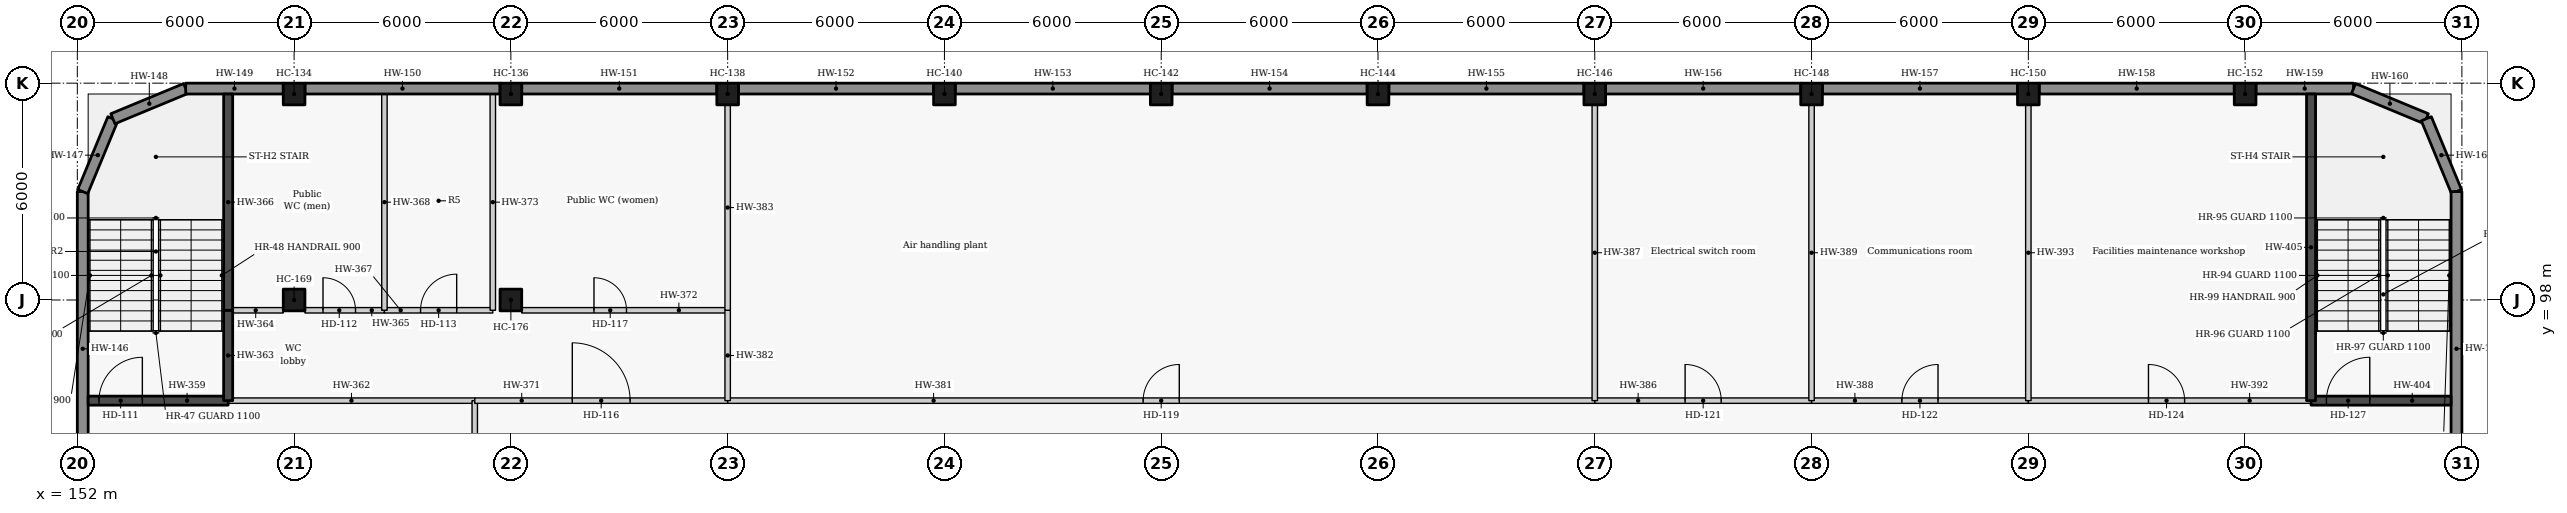
"""IFC4 building model, lengths in metres.
Left out: names, types, materials, properties, quantities, classifications, styles, units other than length and angle.
Written with IfcOpenShell. Run it as: python <this file> out.ifc"""

import sys

from ifc_helpers import new_model, si_unit, direction, frame, frame_2d, origin, origin_2d, place, context, subcontext, project, spatial, rectangle, extrude, element, fill, save


model = new_model("IFC4")
c1 = context("Model", 3, precision=1e-05, world=origin(), true_north=direction((0.0, 1.0)))
c2 = subcontext(c1, "Body", "Model", "MODEL_VIEW")
j1 = project(units=[si_unit("LENGTHUNIT", "METRE"), si_unit("PLANEANGLEUNIT", "RADIAN")], contexts=[c1])
p1 = place(None, origin())
s1 = spatial("IfcSite", under=j1, at=p1, CompositionType="ELEMENT")
p2 = place(p1, origin())
s2 = spatial("IfcBuilding", under=s1, at=p2, CompositionType="ELEMENT")
p3 = place(p2, frame((0.0, 0.0, 15.6)))
s3 = spatial("IfcBuildingStorey", under=s2, at=p3, CompositionType="ELEMENT", Elevation=15.6)
for number, where, z_axis, x_axis in (
    (1, (158.0, 103.7, 0.0), (0.0, 0.0, 1.0), (1.0, 0.0, 0.0)),
    (2, (164.0, 103.7, 0.0), (0.0, 0.0, 1.0), (1.0, 0.0, 0.0)),
    (3, (170.0, 103.7, 0.0), (0.0, 0.0, 1.0), (1.0, 0.0, 0.0)),
    (4, (176.0, 103.7, 0.0), (0.0, 0.0, 1.0), (1.0, 0.0, 0.0)),
    (5, (182.0, 103.7, 0.0), (0.0, 0.0, 1.0), (1.0, 0.0, 0.0)),
    (6, (188.0, 103.7, 0.0), (0.0, 0.0, 1.0), (1.0, 0.0, 0.0)),
    (7, (194.0, 103.7, 0.0), (0.0, 0.0, 1.0), (1.0, 0.0, 0.0)),
    (8, (200.0, 103.7, 0.0), (0.0, 0.0, 1.0), (1.0, 0.0, 0.0)),
    (9, (206.0, 103.7, 0.0), (0.0, 0.0, 1.0), (1.0, 0.0, 0.0)),
    (10, (212.0, 103.7, 0.0), (0.0, 0.0, 1.0), (1.0, 0.0, 0.0)),
    (11, (158.0, 98.0, 0.0), (0.0, 0.0, 1.0), (1.0, 0.0, 0.0)),
    (12, (164.0, 98.0, 0.0), (0.0, 0.0, 1.0), (1.0, 0.0, 0.0)),
):
    element("IfcColumn", number, at=place(p3, frame(where, z_axis=z_axis, x_axis=x_axis)), inside=s3, PredefinedType="COLUMN", context=c2, shape_type="SweptSolid", body=[
        extrude(rectangle(XDim=0.6, YDim=0.6, at=origin_2d()), origin(), (0.0, 0.0, 1.0), 4.2),
    ])
p4 = place(p3, frame((152.15, 92.3, 0.0), z_axis=(0.0, 0.0, 1.0), x_axis=(0.0, 1.0, 0.0)))
e13 = element("IfcWall", 13, at=p4, inside=s3, PredefinedType="SOLIDWALL", context=c2, shape_type="SweptSolid", body=[
    extrude(rectangle(XDim=8.7, YDim=0.3, at=frame_2d((4.35, 0.0))), origin(), (0.0, 0.0, 1.0), 4.2),
])
for number, where, z_axis, x_axis in (
    (14, (152.15, 101.0, 0.0), (0.0, 0.0, 1.0), (0.383, 0.924, 0.0)),
    (15, (152.985, 103.015, 0.0), (0.0, 0.0, 1.0), (0.924, 0.383, 0.0)),
):
    element("IfcWall", number, at=place(p3, frame(where, z_axis=z_axis, x_axis=x_axis)), inside=s3, PredefinedType="SOLIDWALL", context=c2, shape_type="SweptSolid", body=[
        extrude(rectangle(XDim=2.181, YDim=0.3, at=frame_2d((1.091, 0.0))), origin(), (0.0, 0.0, 1.0), 4.2),
    ])
p5 = place(p3, frame((155.0, 103.85, 0.0), z_axis=(0.0, 0.0, 1.0), x_axis=(1.0, 0.0, 0.0)))
e16 = element("IfcWall", 16, at=p5, inside=s3, PredefinedType="SOLIDWALL", context=c2, shape_type="SweptSolid", body=[
    extrude(rectangle(XDim=2.7, YDim=0.3, at=frame_2d((1.35, 0.0))), origin(), (0.0, 0.0, 1.0), 4.2),
])
for number, where, z_axis, x_axis in (
    (17, (158.3, 103.85, 0.0), (0.0, 0.0, 1.0), (1.0, 0.0, 0.0)),
    (18, (164.3, 103.85, 0.0), (0.0, 0.0, 1.0), (1.0, 0.0, 0.0)),
    (19, (170.3, 103.85, 0.0), (0.0, 0.0, 1.0), (1.0, 0.0, 0.0)),
    (20, (176.3, 103.85, 0.0), (0.0, 0.0, 1.0), (1.0, 0.0, 0.0)),
    (21, (182.3, 103.85, 0.0), (0.0, 0.0, 1.0), (1.0, 0.0, 0.0)),
    (22, (188.3, 103.85, 0.0), (0.0, 0.0, 1.0), (1.0, 0.0, 0.0)),
    (23, (194.3, 103.85, 0.0), (0.0, 0.0, 1.0), (1.0, 0.0, 0.0)),
    (24, (200.3, 103.85, 0.0), (0.0, 0.0, 1.0), (1.0, 0.0, 0.0)),
    (25, (206.3, 103.85, 0.0), (0.0, 0.0, 1.0), (1.0, 0.0, 0.0)),
):
    element("IfcWall", number, at=place(p3, frame(where, z_axis=z_axis, x_axis=x_axis)), inside=s3, PredefinedType="SOLIDWALL", context=c2, shape_type="SweptSolid", body=[
        extrude(rectangle(XDim=5.4, YDim=0.3, at=frame_2d((2.7, 0.0))), origin(), (0.0, 0.0, 1.0), 4.2),
    ])
p6 = place(p3, frame((212.3, 103.85, 0.0), z_axis=(0.0, 0.0, 1.0), x_axis=(1.0, 0.0, 0.0)))
e26 = element("IfcWall", 26, at=p6, inside=s3, PredefinedType="SOLIDWALL", context=c2, shape_type="SweptSolid", body=[
    extrude(rectangle(XDim=2.7, YDim=0.3, at=frame_2d((1.35, 0.0))), origin(), (0.0, 0.0, 1.0), 4.2),
])
for number, where, z_axis, x_axis in (
    (27, (215.0, 103.85, 0.0), (0.0, 0.0, 1.0), (0.924, -0.383, 0.0)),
    (28, (217.015, 103.015, 0.0), (0.0, 0.0, 1.0), (0.383, -0.924, 0.0)),
):
    element("IfcWall", number, at=place(p3, frame(where, z_axis=z_axis, x_axis=x_axis)), inside=s3, PredefinedType="SOLIDWALL", context=c2, shape_type="SweptSolid", body=[
        extrude(rectangle(XDim=2.181, YDim=0.3, at=frame_2d((1.091, 0.0))), origin(), (0.0, 0.0, 1.0), 4.2),
    ])
p7 = place(p3, frame((217.85, 101.0, 0.0), z_axis=(0.0, 0.0, 1.0), x_axis=(0.0, -1.0, 0.0)))
e29 = element("IfcWall", 29, at=p7, inside=s3, PredefinedType="SOLIDWALL", context=c2, shape_type="SweptSolid", body=[
    extrude(rectangle(XDim=8.7, YDim=0.3, at=frame_2d((4.35, 0.0))), origin(), (0.0, 0.0, 1.0), 4.2),
])
p8 = place(p3, frame((152.3, 95.215, 0.0), z_axis=(0.0, 0.0, 1.0), x_axis=(1.0, 0.0, 0.0)))
e30 = element("IfcWall", 30, at=p8, inside=s3, PredefinedType="SOLIDWALL", context=c2, shape_type="SweptSolid", body=[
    extrude(rectangle(XDim=3.875, YDim=0.25, at=frame_2d((1.938, 0.0))), origin(), (0.0, 0.0, 1.0), 4.2),
])
p9 = place(p8, frame((0.3, 0.0, 0.0)))
e31 = element("IfcOpeningElement", 31, at=p9, cuts=e30, PredefinedType="OPENING", context=c2, shape_type="SweptSolid", body=[
    extrude(rectangle(XDim=1.2, YDim=2.1, at=frame_2d((0.6, 1.05))), frame((0.0, 0.135, 0.0), z_axis=(0.0, -1.0, 0.0), x_axis=(1.0, 0.0, 0.0)), (0.0, 0.0, 1.0), 0.27),
])
p10 = place(p3, frame((163.0, 95.215, 0.0), z_axis=(0.0, 0.0, 1.0), x_axis=(-1.0, 0.0, 0.0)))
e32 = element("IfcWall", 32, at=p10, inside=s3, PredefinedType="PARTITIONING", context=c2, shape_type="SweptSolid", body=[
    extrude(rectangle(XDim=6.825, YDim=0.15, at=frame_2d((3.413, 0.0))), origin(), (0.0, 0.0, 1.0), 3.85),
])
p11 = place(p3, frame((156.175, 97.715, 0.0), z_axis=(0.0, 0.0, 1.0), x_axis=(0.0, -1.0, 0.0)))
e33 = element("IfcWall", 33, at=p11, inside=s3, PredefinedType="SOLIDWALL", context=c2, shape_type="SweptSolid", body=[
    extrude(rectangle(XDim=2.5, YDim=0.25, at=frame_2d((1.25, 0.0))), origin(), (0.0, 0.0, 1.0), 4.2),
])
p12 = place(p3, frame((156.175, 97.715, 0.0), z_axis=(0.0, 0.0, 1.0), x_axis=(1.0, 0.0, 0.0)))
e34 = element("IfcWall", 34, at=p12, inside=s3, PredefinedType="PLUMBINGWALL", context=c2, shape_type="SweptSolid", body=[
    extrude(rectangle(XDim=1.525, YDim=0.15, at=frame_2d((0.762, 0.0))), origin(), (0.0, 0.0, 1.0), 3.85),
])
p13 = place(p3, frame((158.3, 97.715, 0.0), z_axis=(0.0, 0.0, 1.0), x_axis=(1.0, 0.0, 0.0)))
e35 = element("IfcWall", 35, at=p13, inside=s3, PredefinedType="PLUMBINGWALL", context=c2, shape_type="SweptSolid", body=[
    extrude(rectangle(XDim=2.2, YDim=0.15, at=frame_2d((1.1, 0.0))), origin(), (0.0, 0.0, 1.0), 3.85),
])
p14 = place(p13, frame((0.5, 0.0, 0.0)))
e36 = element("IfcOpeningElement", 36, at=p14, cuts=e35, PredefinedType="OPENING", context=c2, shape_type="SweptSolid", body=[
    extrude(rectangle(XDim=0.9, YDim=2.1, at=frame_2d((0.45, 1.05))), frame((0.0, 0.085, 0.0), z_axis=(0.0, -1.0, 0.0), x_axis=(1.0, 0.0, 0.0)), (0.0, 0.0, 1.0), 0.17),
])
p15 = place(p3, frame((156.175, 103.7, 0.0), z_axis=(0.0, 0.0, 1.0), x_axis=(0.0, -1.0, 0.0)))
e37 = element("IfcWall", 37, at=p15, inside=s3, PredefinedType="SOLIDWALL", context=c2, shape_type="SweptSolid", body=[
    extrude(rectangle(XDim=5.985, YDim=0.25, at=frame_2d((2.992, 0.0))), origin(), (0.0, 0.0, 1.0), 4.2),
])
p16 = place(p3, frame((160.5, 97.715, 0.0), z_axis=(0.0, 0.0, 1.0), x_axis=(1.0, 0.0, 0.0)))
e38 = element("IfcWall", 38, at=p16, inside=s3, PredefinedType="PLUMBINGWALL", context=c2, shape_type="SweptSolid", body=[
    extrude(rectangle(XDim=3.0, YDim=0.15, at=frame_2d((1.5, 0.0))), origin(), (0.0, 0.0, 1.0), 3.85),
])
p17 = place(p16, frame((1.0, 0.0, 0.0)))
e39 = element("IfcOpeningElement", 39, at=p17, cuts=e38, PredefinedType="OPENING", context=c2, shape_type="SweptSolid", body=[
    extrude(rectangle(XDim=1.0, YDim=2.1, at=frame_2d((0.5, 1.05))), frame((0.0, 0.085, 0.0), z_axis=(0.0, -1.0, 0.0), x_axis=(1.0, 0.0, 0.0)), (0.0, 0.0, 1.0), 0.17),
])
p18 = place(p3, frame((160.5, 103.7, 0.0), z_axis=(0.0, 0.0, 1.0), x_axis=(0.0, -1.0, 0.0)))
e40 = element("IfcWall", 40, at=p18, inside=s3, PredefinedType="PLUMBINGWALL", context=c2, shape_type="SweptSolid", body=[
    extrude(rectangle(XDim=5.985, YDim=0.15, at=frame_2d((2.992, 0.0))), origin(), (0.0, 0.0, 1.0), 3.85),
])
p19 = place(p3, frame((163.0, 64.785, 0.0), z_axis=(0.0, 0.0, 1.0), x_axis=(0.0, 1.0, 0.0)))
e41 = element("IfcWall", 41, at=p19, inside=s3, PredefinedType="PARTITIONING", context=c2, shape_type="SweptSolid", body=[
    extrude(rectangle(XDim=30.43, YDim=0.15, at=frame_2d((15.215, 0.0))), origin(), (0.0, 0.0, 1.0), 3.85),
])
p20 = place(p19, frame((15.68, 0.0, 0.0)))
e42 = element("IfcOpeningElement", 42, at=p20, cuts=e41, PredefinedType="OPENING", context=c2, shape_type="SweptSolid", body=[
    extrude(rectangle(XDim=1.0, YDim=2.1, at=frame_2d((0.5, 1.05))), frame((0.0, 0.085, 0.0), z_axis=(0.0, -1.0, 0.0), x_axis=(1.0, 0.0, 0.0)), (0.0, 0.0, 1.0), 0.17),
])
p21 = place(p3, frame((163.0, 95.215, 0.0), z_axis=(0.0, 0.0, 1.0), x_axis=(1.0, 0.0, 0.0)))
e43 = element("IfcWall", 43, at=p21, inside=s3, PredefinedType="PARTITIONING", context=c2, shape_type="SweptSolid", body=[
    extrude(rectangle(XDim=7.0, YDim=0.15, at=frame_2d((3.5, 0.0))), origin(), (0.0, 0.0, 1.0), 3.85),
])
p22 = place(p21, frame((2.7, 0.0, 0.0)))
e44 = element("IfcOpeningElement", 44, at=p22, cuts=e43, PredefinedType="OPENING", context=c2, shape_type="SweptSolid", body=[
    extrude(rectangle(XDim=1.6, YDim=2.1, at=frame_2d((0.8, 1.05))), frame((0.0, 0.085, 0.0), z_axis=(0.0, -1.0, 0.0), x_axis=(1.0, 0.0, 0.0)), (0.0, 0.0, 1.0), 0.17),
])
p23 = place(p3, frame((164.3, 97.715, 0.0), z_axis=(0.0, 0.0, 1.0), x_axis=(1.0, 0.0, 0.0)))
e45 = element("IfcWall", 45, at=p23, inside=s3, PredefinedType="PLUMBINGWALL", context=c2, shape_type="SweptSolid", body=[
    extrude(rectangle(XDim=5.7, YDim=0.15, at=frame_2d((2.85, 0.0))), origin(), (0.0, 0.0, 1.0), 3.85),
])
p24 = place(p23, frame((2.0, 0.0, 0.0)))
e46 = element("IfcOpeningElement", 46, at=p24, cuts=e45, PredefinedType="OPENING", context=c2, shape_type="SweptSolid", body=[
    extrude(rectangle(XDim=0.9, YDim=2.1, at=frame_2d((0.45, 1.05))), frame((0.0, 0.085, 0.0), z_axis=(0.0, -1.0, 0.0), x_axis=(1.0, 0.0, 0.0)), (0.0, 0.0, 1.0), 0.17),
])
p25 = place(p3, frame((163.5, 103.7, 0.0), z_axis=(0.0, 0.0, 1.0), x_axis=(0.0, -1.0, 0.0)))
e47 = element("IfcWall", 47, at=p25, inside=s3, PredefinedType="PLUMBINGWALL", context=c2, shape_type="SweptSolid", body=[
    extrude(rectangle(XDim=5.985, YDim=0.15, at=frame_2d((2.992, 0.0))), origin(), (0.0, 0.0, 1.0), 3.85),
])
p26 = place(p3, frame((170.0, 95.215, 0.0), z_axis=(0.0, 0.0, 1.0), x_axis=(1.0, 0.0, 0.0)))
e48 = element("IfcWall", 48, at=p26, inside=s3, PredefinedType="PARTITIONING", context=c2, shape_type="SweptSolid", body=[
    extrude(rectangle(XDim=24.0, YDim=0.15, at=frame_2d((12.0, 0.0))), origin(), (0.0, 0.0, 1.0), 3.85),
])
p27 = place(p26, frame((11.5, 0.0, 0.0)))
e49 = element("IfcOpeningElement", 49, at=p27, cuts=e48, PredefinedType="OPENING", context=c2, shape_type="SweptSolid", body=[
    extrude(rectangle(XDim=1.0, YDim=2.1, at=frame_2d((0.5, 1.05))), frame((0.0, 0.085, 0.0), z_axis=(0.0, -1.0, 0.0), x_axis=(1.0, 0.0, 0.0)), (0.0, 0.0, 1.0), 0.17),
])
p28 = place(p3, frame((170.0, 97.715, 0.0), z_axis=(0.0, 0.0, 1.0), x_axis=(0.0, -1.0, 0.0)))
e50 = element("IfcWall", 50, at=p28, inside=s3, PredefinedType="PARTITIONING", context=c2, shape_type="SweptSolid", body=[
    extrude(rectangle(XDim=2.5, YDim=0.15, at=frame_2d((1.25, 0.0))), origin(), (0.0, 0.0, 1.0), 3.85),
])
p29 = place(p3, frame((170.0, 103.4, 0.0), z_axis=(0.0, 0.0, 1.0), x_axis=(0.0, -1.0, 0.0)))
e51 = element("IfcWall", 51, at=p29, inside=s3, PredefinedType="PLUMBINGWALL", context=c2, shape_type="SweptSolid", body=[
    extrude(rectangle(XDim=5.685, YDim=0.15, at=frame_2d((2.842, 0.0))), origin(), (0.0, 0.0, 1.0), 3.85),
])
p30 = place(p3, frame((194.0, 95.215, 0.0), z_axis=(0.0, 0.0, 1.0), x_axis=(1.0, 0.0, 0.0)))
e52 = element("IfcWall", 52, at=p30, inside=s3, PredefinedType="PARTITIONING", context=c2, shape_type="SweptSolid", body=[
    extrude(rectangle(XDim=6.0, YDim=0.15, at=frame_2d((3.0, 0.0))), origin(), (0.0, 0.0, 1.0), 3.85),
])
p31 = place(p30, frame((2.5, 0.0, 0.0)))
e53 = element("IfcOpeningElement", 53, at=p31, cuts=e52, PredefinedType="OPENING", context=c2, shape_type="SweptSolid", body=[
    extrude(rectangle(XDim=1.0, YDim=2.1, at=frame_2d((0.5, 1.05))), frame((0.0, 0.085, 0.0), z_axis=(0.0, -1.0, 0.0), x_axis=(1.0, 0.0, 0.0)), (0.0, 0.0, 1.0), 0.17),
])
p32 = place(p3, frame((194.0, 103.4, 0.0), z_axis=(0.0, 0.0, 1.0), x_axis=(0.0, -1.0, 0.0)))
e54 = element("IfcWall", 54, at=p32, inside=s3, PredefinedType="PARTITIONING", context=c2, shape_type="SweptSolid", body=[
    extrude(rectangle(XDim=8.185, YDim=0.15, at=frame_2d((4.092, 0.0))), origin(), (0.0, 0.0, 1.0), 3.85),
])
p33 = place(p3, frame((200.0, 95.215, 0.0), z_axis=(0.0, 0.0, 1.0), x_axis=(1.0, 0.0, 0.0)))
e55 = element("IfcWall", 55, at=p33, inside=s3, PredefinedType="PARTITIONING", context=c2, shape_type="SweptSolid", body=[
    extrude(rectangle(XDim=6.0, YDim=0.15, at=frame_2d((3.0, 0.0))), origin(), (0.0, 0.0, 1.0), 3.85),
])
p34 = place(p33, frame((2.5, 0.0, 0.0)))
e56 = element("IfcOpeningElement", 56, at=p34, cuts=e55, PredefinedType="OPENING", context=c2, shape_type="SweptSolid", body=[
    extrude(rectangle(XDim=1.0, YDim=2.1, at=frame_2d((0.5, 1.05))), frame((0.0, 0.085, 0.0), z_axis=(0.0, -1.0, 0.0), x_axis=(1.0, 0.0, 0.0)), (0.0, 0.0, 1.0), 0.17),
])
p35 = place(p3, frame((200.0, 103.4, 0.0), z_axis=(0.0, 0.0, 1.0), x_axis=(0.0, -1.0, 0.0)))
e57 = element("IfcWall", 57, at=p35, inside=s3, PredefinedType="PARTITIONING", context=c2, shape_type="SweptSolid", body=[
    extrude(rectangle(XDim=8.185, YDim=0.15, at=frame_2d((4.092, 0.0))), origin(), (0.0, 0.0, 1.0), 3.85),
])
p36 = place(p3, frame((206.0, 95.215, 0.0), z_axis=(0.0, 0.0, 1.0), x_axis=(1.0, 0.0, 0.0)))
e58 = element("IfcWall", 58, at=p36, inside=s3, PredefinedType="PARTITIONING", context=c2, shape_type="SweptSolid", body=[
    extrude(rectangle(XDim=7.825, YDim=0.15, at=frame_2d((3.913, 0.0))), origin(), (0.0, 0.0, 1.0), 3.85),
])
p37 = place(p36, frame((3.325, 0.0, 0.0)))
e59 = element("IfcOpeningElement", 59, at=p37, cuts=e58, PredefinedType="OPENING", context=c2, shape_type="SweptSolid", body=[
    extrude(rectangle(XDim=1.0, YDim=2.1, at=frame_2d((0.5, 1.05))), frame((0.0, 0.085, 0.0), z_axis=(0.0, -1.0, 0.0), x_axis=(1.0, 0.0, 0.0)), (0.0, 0.0, 1.0), 0.17),
])
p38 = place(p3, frame((206.0, 103.4, 0.0), z_axis=(0.0, 0.0, 1.0), x_axis=(0.0, -1.0, 0.0)))
e60 = element("IfcWall", 60, at=p38, inside=s3, PredefinedType="PARTITIONING", context=c2, shape_type="SweptSolid", body=[
    extrude(rectangle(XDim=8.185, YDim=0.15, at=frame_2d((4.092, 0.0))), origin(), (0.0, 0.0, 1.0), 3.85),
])
p39 = place(p3, frame((213.825, 95.215, 0.0), z_axis=(0.0, 0.0, 1.0), x_axis=(1.0, 0.0, 0.0)))
e61 = element("IfcWall", 61, at=p39, inside=s3, PredefinedType="SOLIDWALL", context=c2, shape_type="SweptSolid", body=[
    extrude(rectangle(XDim=3.875, YDim=0.25, at=frame_2d((1.938, 0.0))), origin(), (0.0, 0.0, 1.0), 4.2),
])
p40 = place(p39, frame((0.425, 0.0, 0.0)))
e62 = element("IfcOpeningElement", 62, at=p40, cuts=e61, PredefinedType="OPENING", context=c2, shape_type="SweptSolid", body=[
    extrude(rectangle(XDim=1.2, YDim=2.1, at=frame_2d((0.6, 1.05))), frame((0.0, 0.135, 0.0), z_axis=(0.0, -1.0, 0.0), x_axis=(1.0, 0.0, 0.0)), (0.0, 0.0, 1.0), 0.27),
])
p41 = place(p3, frame((213.825, 95.215, 0.0), z_axis=(0.0, 0.0, 1.0), x_axis=(0.0, 1.0, 0.0)))
e63 = element("IfcWall", 63, at=p41, inside=s3, PredefinedType="SOLIDWALL", context=c2, shape_type="SweptSolid", body=[
    extrude(rectangle(XDim=8.485, YDim=0.25, at=frame_2d((4.242, 0.0))), origin(), (0.0, 0.0, 1.0), 4.2),
])
p42 = place(p9, origin())
e64 = element("IfcDoor", 64, at=p42, inside=s3, OperationType="SINGLE_SWING_RIGHT", PredefinedType="DOOR", context=c2, shape_type="SweptSolid", body=[
    extrude(rectangle(XDim=1.2, YDim=2.1, at=frame_2d((0.6, 1.05))), frame((0.0, 0.025, 0.0), z_axis=(0.0, -1.0, 0.0), x_axis=(1.0, 0.0, 0.0)), (0.0, 0.0, 1.0), 0.05),
])
fill(e31, e64)
p43 = place(p14, origin())
e65 = element("IfcDoor", 65, at=p43, inside=s3, OperationType="SINGLE_SWING_LEFT", PredefinedType="DOOR", context=c2, shape_type="SweptSolid", body=[
    extrude(rectangle(XDim=0.9, YDim=2.1, at=frame_2d((0.45, 1.05))), frame((0.0, 0.025, 0.0), z_axis=(0.0, -1.0, 0.0), x_axis=(1.0, 0.0, 0.0)), (0.0, 0.0, 1.0), 0.05),
])
fill(e36, e65)
p44 = place(p17, origin())
e66 = element("IfcDoor", 66, at=p44, inside=s3, OperationType="SINGLE_SWING_RIGHT", PredefinedType="DOOR", context=c2, shape_type="SweptSolid", body=[
    extrude(rectangle(XDim=1.0, YDim=2.1, at=frame_2d((0.5, 1.05))), frame((0.0, 0.025, 0.0), z_axis=(0.0, -1.0, 0.0), x_axis=(1.0, 0.0, 0.0)), (0.0, 0.0, 1.0), 0.05),
])
fill(e39, e66)
p45 = place(p22, origin())
e67 = element("IfcDoor", 67, at=p45, inside=s3, OperationType="DOUBLE_DOOR_SINGLE_SWING", PredefinedType="DOOR", context=c2, shape_type="SweptSolid", body=[
    extrude(rectangle(XDim=1.6, YDim=2.1, at=frame_2d((0.8, 1.05))), frame((0.0, 0.025, 0.0), z_axis=(0.0, -1.0, 0.0), x_axis=(1.0, 0.0, 0.0)), (0.0, 0.0, 1.0), 0.05),
])
fill(e44, e67)
p46 = place(p24, origin())
e68 = element("IfcDoor", 68, at=p46, inside=s3, OperationType="SINGLE_SWING_LEFT", PredefinedType="DOOR", context=c2, shape_type="SweptSolid", body=[
    extrude(rectangle(XDim=0.9, YDim=2.1, at=frame_2d((0.45, 1.05))), frame((0.0, 0.025, 0.0), z_axis=(0.0, -1.0, 0.0), x_axis=(1.0, 0.0, 0.0)), (0.0, 0.0, 1.0), 0.05),
])
fill(e46, e68)
p47 = place(p27, origin())
e69 = element("IfcDoor", 69, at=p47, inside=s3, OperationType="SINGLE_SWING_RIGHT", PredefinedType="DOOR", context=c2, shape_type="SweptSolid", body=[
    extrude(rectangle(XDim=1.0, YDim=2.1, at=frame_2d((0.5, 1.05))), frame((0.0, 0.025, 0.0), z_axis=(0.0, -1.0, 0.0), x_axis=(1.0, 0.0, 0.0)), (0.0, 0.0, 1.0), 0.05),
])
fill(e49, e69)
p48 = place(p31, origin())
e70 = element("IfcDoor", 70, at=p48, inside=s3, OperationType="SINGLE_SWING_LEFT", PredefinedType="DOOR", context=c2, shape_type="SweptSolid", body=[
    extrude(rectangle(XDim=1.0, YDim=2.1, at=frame_2d((0.5, 1.05))), frame((0.0, 0.025, 0.0), z_axis=(0.0, -1.0, 0.0), x_axis=(1.0, 0.0, 0.0)), (0.0, 0.0, 1.0), 0.05),
])
fill(e53, e70)
p49 = place(p34, origin())
e71 = element("IfcDoor", 71, at=p49, inside=s3, OperationType="SINGLE_SWING_RIGHT", PredefinedType="DOOR", context=c2, shape_type="SweptSolid", body=[
    extrude(rectangle(XDim=1.0, YDim=2.1, at=frame_2d((0.5, 1.05))), frame((0.0, 0.025, 0.0), z_axis=(0.0, -1.0, 0.0), x_axis=(1.0, 0.0, 0.0)), (0.0, 0.0, 1.0), 0.05),
])
fill(e56, e71)
p50 = place(p37, origin())
e72 = element("IfcDoor", 72, at=p50, inside=s3, OperationType="SINGLE_SWING_LEFT", PredefinedType="DOOR", context=c2, shape_type="SweptSolid", body=[
    extrude(rectangle(XDim=1.0, YDim=2.1, at=frame_2d((0.5, 1.05))), frame((0.0, 0.025, 0.0), z_axis=(0.0, -1.0, 0.0), x_axis=(1.0, 0.0, 0.0)), (0.0, 0.0, 1.0), 0.05),
])
fill(e59, e72)
p51 = place(p40, origin())
e73 = element("IfcDoor", 73, at=p51, inside=s3, OperationType="SINGLE_SWING_RIGHT", PredefinedType="DOOR", context=c2, shape_type="SweptSolid", body=[
    extrude(rectangle(XDim=1.2, YDim=2.1, at=frame_2d((0.6, 1.05))), frame((0.0, 0.025, 0.0), z_axis=(0.0, -1.0, 0.0), x_axis=(1.0, 0.0, 0.0)), (0.0, 0.0, 1.0), 0.05),
])
fill(e62, e73)
save(model, sys.argv[1])
